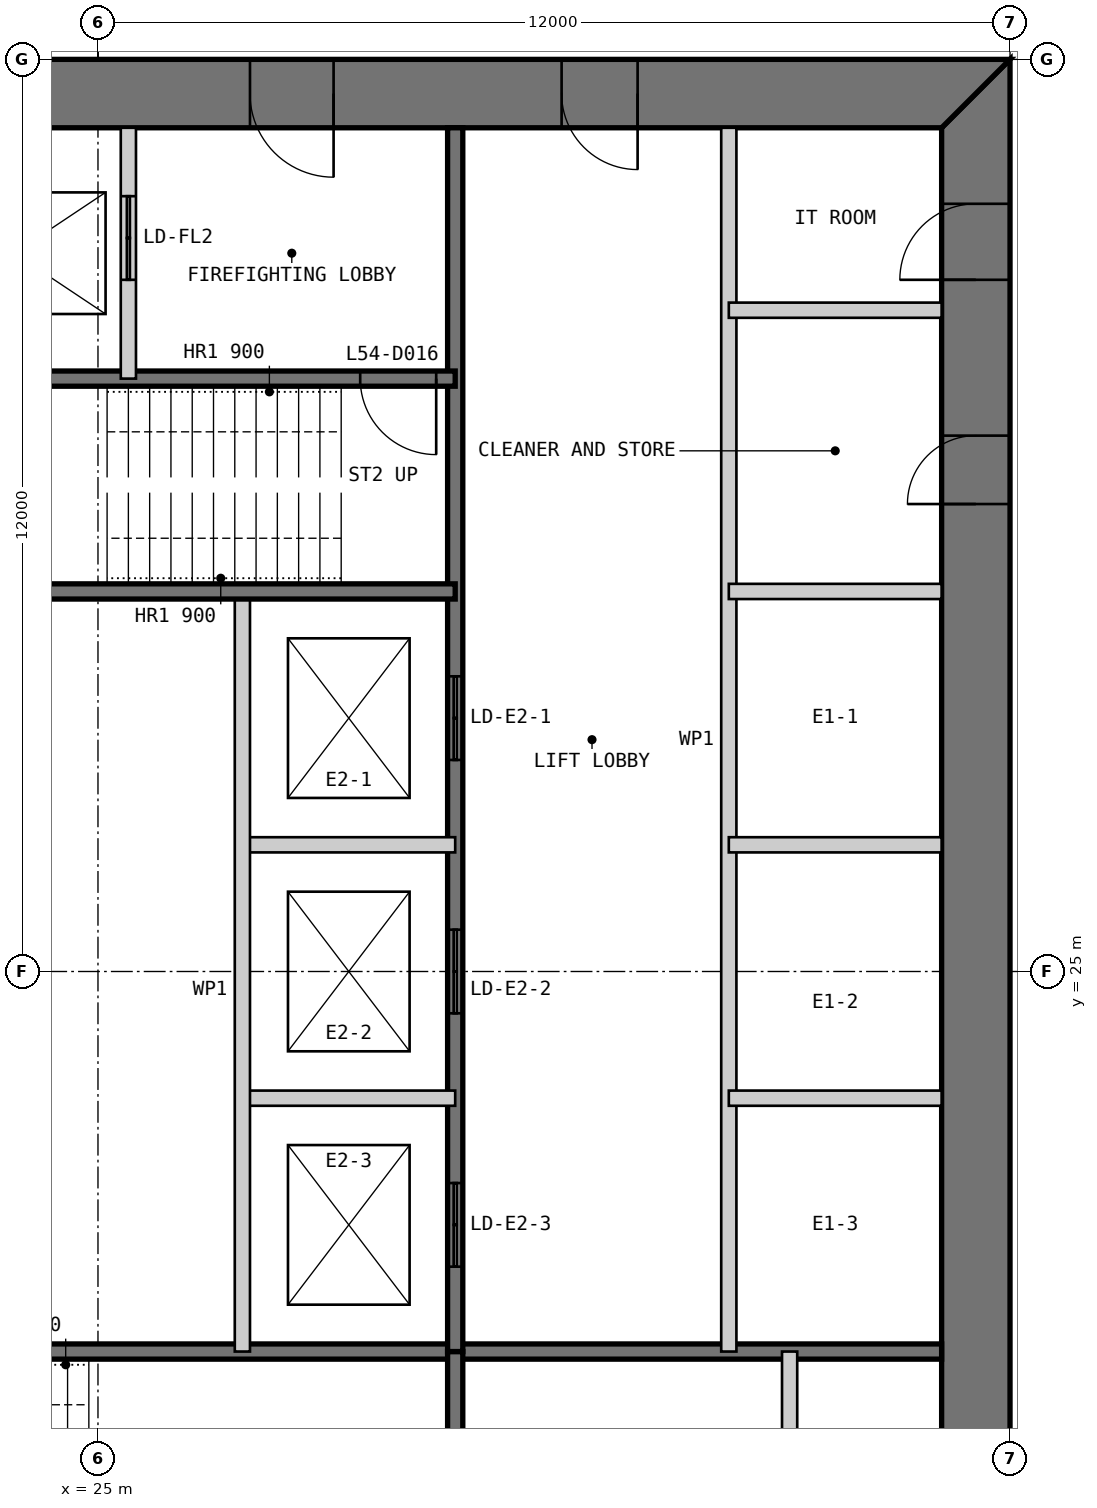
"""IFC4 building model, lengths in metres.
Left out: names, types, materials, properties, quantities, classifications, styles, units other than length and angle.
Written with IfcOpenShell. Run it as: python <this file> out.ifc"""

import sys

from ifc_helpers import new_model, si_unit, direction, frame, frame_2d, origin, place, context, subcontext, project, spatial, polyline, rectangle, outline, extrude, element, fill, save


model = new_model("IFC4")
c1 = context("Model", 3, precision=1e-05, world=origin(), true_north=direction((0.0, 1.0)))
c2 = subcontext(c1, "Body", "Model", "MODEL_VIEW")
j1 = project(units=[si_unit("LENGTHUNIT", "METRE"), si_unit("PLANEANGLEUNIT", "RADIAN")], contexts=[c1])
p1 = place(None, origin())
s1 = spatial("IfcSite", under=j1, at=p1, CompositionType="ELEMENT")
p2 = place(p1, origin())
s2 = spatial("IfcBuilding", under=s1, at=p2, CompositionType="ELEMENT")
p3 = place(p2, frame((0.0, 0.0, 229.8)))
s3 = spatial("IfcBuildingStorey", under=s2, at=p3, CompositionType="ELEMENT", Elevation=229.8)
p4 = place(p3, frame((36.55, 13.9, 0.0), z_axis=(0.0, 0.0, 1.0), x_axis=(0.0, 1.0, 0.0)))
e1 = element("IfcWall", 1, at=p4, inside=s3, PredefinedType="SHEAR", context=c2, shape_type="SweptSolid", body=[
    extrude(outline(polyline([(-0.9, -0.45), (23.1, -0.45), (22.2, 0.45), (0.0, 0.45), (-0.9, -0.45)])), origin(), (0.0, 0.0, 1.0), 4.0),
])
p5 = place(p4, frame((20.2, 0.0, 0.0)))
e2 = element("IfcOpeningElement", 2, at=p5, cuts=e1, PredefinedType="OPENING", context=c2, shape_type="SweptSolid", body=[
    extrude(rectangle(XDim=1.0, YDim=2.2, at=frame_2d((0.5, 1.1))), frame((0.0, 0.46, 0.0), z_axis=(0.0, -1.0, 0.0), x_axis=(1.0, 0.0, 0.0)), (0.0, 0.0, 1.0), 0.92),
])
p6 = place(p4, frame((17.25, 0.0, 0.0)))
e3 = element("IfcOpeningElement", 3, at=p6, cuts=e1, PredefinedType="OPENING", context=c2, shape_type="SweptSolid", body=[
    extrude(rectangle(XDim=0.9, YDim=2.2, at=frame_2d((0.45, 1.1))), frame((0.0, 0.46, 0.0), z_axis=(0.0, -1.0, 0.0), x_axis=(1.0, 0.0, 0.0)), (0.0, 0.0, 1.0), 0.92),
])
p7 = place(p3, frame((37.0, 36.55, 0.0), z_axis=(0.0, 0.0, 1.0), x_axis=(-1.0, 0.0, 0.0)))
e4 = element("IfcWall", 4, at=p7, inside=s3, PredefinedType="SHEAR", context=c2, shape_type="SweptSolid", body=[
    extrude(outline(polyline([(0.0, -0.45), (24.0, -0.45), (23.1, 0.45), (0.9, 0.45), (0.0, -0.45)])), origin(), (0.0, 0.0, 1.0), 4.0),
])
p8 = place(p7, frame((4.9, 0.0, 0.0)))
e5 = element("IfcOpeningElement", 5, at=p8, cuts=e4, PredefinedType="OPENING", context=c2, shape_type="SweptSolid", body=[
    extrude(rectangle(XDim=1.0, YDim=2.2, at=frame_2d((0.5, 1.1))), frame((0.0, 0.46, 0.0), z_axis=(0.0, -1.0, 0.0), x_axis=(1.0, 0.0, 0.0)), (0.0, 0.0, 1.0), 0.92),
])
p9 = place(p7, frame((8.9, 0.0, 0.0)))
e6 = element("IfcOpeningElement", 6, at=p9, cuts=e4, PredefinedType="OPENING", context=c2, shape_type="SweptSolid", body=[
    extrude(rectangle(XDim=1.1, YDim=2.2, at=frame_2d((0.55, 1.1))), frame((0.0, 0.46, 0.0), z_axis=(0.0, -1.0, 0.0), x_axis=(1.0, 0.0, 0.0)), (0.0, 0.0, 1.0), 0.92),
])
p10 = place(p7, frame((15.05, 0.0, 0.0)))
e7 = element("IfcOpeningElement", 7, at=p10, cuts=e4, PredefinedType="OPENING", context=c2, shape_type="SweptSolid", body=[
    extrude(rectangle(XDim=0.9, YDim=2.2, at=frame_2d((0.45, 1.1))), frame((0.0, 0.46, 0.0), z_axis=(0.0, -1.0, 0.0), x_axis=(1.0, 0.0, 0.0)), (0.0, 0.0, 1.0), 0.92),
])
p11 = place(p7, frame((17.9, 0.0, 0.0)))
e8 = element("IfcOpeningElement", 8, at=p11, cuts=e4, PredefinedType="OPENING", context=c2, shape_type="SweptSolid", body=[
    extrude(rectangle(XDim=1.0, YDim=2.2, at=frame_2d((0.5, 1.1))), frame((0.0, 0.46, 0.0), z_axis=(0.0, -1.0, 0.0), x_axis=(1.0, 0.0, 0.0)), (0.0, 0.0, 1.0), 0.92),
])
p12 = place(p7, frame((21.4, 0.0, 0.0)))
e9 = element("IfcOpeningElement", 9, at=p12, cuts=e4, PredefinedType="OPENING", context=c2, shape_type="SweptSolid", body=[
    extrude(rectangle(XDim=1.0, YDim=2.2, at=frame_2d((0.5, 1.1))), frame((0.0, 0.46, 0.0), z_axis=(0.0, -1.0, 0.0), x_axis=(1.0, 0.0, 0.0)), (0.0, 0.0, 1.0), 0.92),
])
p13 = place(p3, frame((20.3, 20.0, 0.0), z_axis=(0.0, 0.0, 1.0), x_axis=(1.0, 0.0, 0.0)))
e10 = element("IfcWall", 10, at=p13, inside=s3, PredefinedType="SOLIDWALL", context=c2, shape_type="SweptSolid", body=[
    extrude(rectangle(XDim=15.8, YDim=0.2, at=frame_2d((7.9, 0.0))), origin(), (0.0, 0.0, 1.0), 3.8),
])
p14 = place(p3, frame((29.7, 13.9, 0.0), z_axis=(0.0, 0.0, 1.0), x_axis=(0.0, 1.0, 0.0)))
e11 = element("IfcWall", 11, at=p14, inside=s3, PredefinedType="SOLIDWALL", context=c2, shape_type="SweptSolid", body=[
    extrude(rectangle(XDim=6.1, YDim=0.2, at=frame_2d((3.05, 0.0))), origin(), (0.0, 0.0, 1.0), 3.8),
])
p15 = place(p3, frame((34.1, 13.9, 0.0), z_axis=(0.0, 0.0, 1.0), x_axis=(0.0, 1.0, 0.0)))
e12 = element("IfcWall", 12, at=p15, inside=s3, PredefinedType="PARTITIONING", context=c2, shape_type="SweptSolid", body=[
    extrude(rectangle(XDim=6.1, YDim=0.2, at=frame_2d((3.05, 0.0))), origin(), (0.0, 0.0, 1.0), 3.8),
])
p16 = place(p3, frame((33.3, 36.1, 0.0), z_axis=(0.0, 0.0, 1.0), x_axis=(0.0, -1.0, 0.0)))
e13 = element("IfcWall", 13, at=p16, inside=s3, PredefinedType="PARTITIONING", context=c2, shape_type="SweptSolid", body=[
    extrude(rectangle(XDim=16.1, YDim=0.2, at=frame_2d((8.05, 0.0))), origin(), (0.0, 0.0, 1.0), 3.8),
])
p17 = place(p3, frame((29.7, 36.1, 0.0), z_axis=(0.0, 0.0, 1.0), x_axis=(0.0, -1.0, 0.0)))
e14 = element("IfcWall", 14, at=p17, inside=s3, PredefinedType="SOLIDWALL", context=c2, shape_type="SweptSolid", body=[
    extrude(rectangle(XDim=16.1, YDim=0.2, at=frame_2d((8.05, 0.0))), origin(), (0.0, 0.0, 1.0), 3.8),
])
p18 = place(p17, frame((7.217, 0.0, 0.0)))
e15 = element("IfcOpeningElement", 15, at=p18, cuts=e14, PredefinedType="OPENING", context=c2, shape_type="SweptSolid", body=[
    extrude(rectangle(XDim=1.1, YDim=2.2, at=frame_2d((0.55, 1.1))), frame((0.0, 0.11, 0.0), z_axis=(0.0, -1.0, 0.0), x_axis=(1.0, 0.0, 0.0)), (0.0, 0.0, 1.0), 0.22),
])
p19 = place(p17, frame((10.55, 0.0, 0.0)))
e16 = element("IfcOpeningElement", 16, at=p19, cuts=e14, PredefinedType="OPENING", context=c2, shape_type="SweptSolid", body=[
    extrude(rectangle(XDim=1.1, YDim=2.2, at=frame_2d((0.55, 1.1))), frame((0.0, 0.11, 0.0), z_axis=(0.0, -1.0, 0.0), x_axis=(1.0, 0.0, 0.0)), (0.0, 0.0, 1.0), 0.22),
])
p20 = place(p17, frame((13.883, 0.0, 0.0)))
e17 = element("IfcOpeningElement", 17, at=p20, cuts=e14, PredefinedType="OPENING", context=c2, shape_type="SweptSolid", body=[
    extrude(rectangle(XDim=1.1, YDim=2.2, at=frame_2d((0.55, 1.1))), frame((0.0, 0.11, 0.0), z_axis=(0.0, -1.0, 0.0), x_axis=(1.0, 0.0, 0.0)), (0.0, 0.0, 1.0), 0.22),
])
for number, where, z_axis, x_axis in (
    (18, (36.1, 30.0, 0.0), (0.0, 0.0, 1.0), (-1.0, 0.0, 0.0)),
    (19, (36.1, 26.667, 0.0), (0.0, 0.0, 1.0), (-1.0, 0.0, 0.0)),
    (20, (36.1, 23.333, 0.0), (0.0, 0.0, 1.0), (-1.0, 0.0, 0.0)),
    (21, (29.7, 26.667, 0.0), (0.0, 0.0, 1.0), (-1.0, 0.0, 0.0)),
    (22, (29.7, 23.333, 0.0), (0.0, 0.0, 1.0), (-1.0, 0.0, 0.0)),
):
    element("IfcWall", number, at=place(p3, frame(where, z_axis=z_axis, x_axis=x_axis)), inside=s3, PredefinedType="PARTITIONING", context=c2, shape_type="SweptSolid", body=[
        extrude(rectangle(XDim=2.8, YDim=0.2, at=frame_2d((1.4, 0.0))), origin(), (0.0, 0.0, 1.0), 3.8),
    ])
p21 = place(p3, frame((26.9, 30.0, 0.0), z_axis=(0.0, 0.0, 1.0), x_axis=(0.0, -1.0, 0.0)))
e23 = element("IfcWall", 23, at=p21, inside=s3, PredefinedType="PARTITIONING", context=c2, shape_type="SweptSolid", body=[
    extrude(rectangle(XDim=10.0, YDim=0.2, at=frame_2d((5.0, 0.0))), origin(), (0.0, 0.0, 1.0), 3.8),
])
p22 = place(p3, frame((29.7, 32.8, 0.0), z_axis=(0.0, 0.0, 1.0), x_axis=(-1.0, 0.0, 0.0)))
e24 = element("IfcWall", 24, at=p22, inside=s3, PredefinedType="SOLIDWALL", context=c2, shape_type="SweptSolid", body=[
    extrude(rectangle(XDim=9.4, YDim=0.2, at=frame_2d((4.7, 0.0))), origin(), (0.0, 0.0, 1.0), 3.8),
])
p23 = place(p22, frame((0.25, 0.0, 0.0)))
e25 = element("IfcOpeningElement", 25, at=p23, cuts=e24, PredefinedType="OPENING", context=c2, shape_type="SweptSolid", body=[
    extrude(rectangle(XDim=1.0, YDim=2.2, at=frame_2d((0.5, 1.1))), frame((0.0, 0.11, 0.0), z_axis=(0.0, -1.0, 0.0), x_axis=(1.0, 0.0, 0.0)), (0.0, 0.0, 1.0), 0.22),
])
p24 = place(p3, frame((29.7, 30.0, 0.0), z_axis=(0.0, 0.0, 1.0), x_axis=(-1.0, 0.0, 0.0)))
e26 = element("IfcWall", 26, at=p24, inside=s3, PredefinedType="SOLIDWALL", context=c2, shape_type="SweptSolid", body=[
    extrude(rectangle(XDim=15.8, YDim=0.2, at=frame_2d((7.9, 0.0))), origin(), (0.0, 0.0, 1.0), 3.8),
])
p25 = place(p3, frame((25.4, 36.1, 0.0), z_axis=(0.0, 0.0, 1.0), x_axis=(0.0, -1.0, 0.0)))
e27 = element("IfcWall", 27, at=p25, inside=s3, PredefinedType="PARTITIONING", context=c2, shape_type="SweptSolid", body=[
    extrude(rectangle(XDim=3.3, YDim=0.2, at=frame_2d((1.65, 0.0))), origin(), (0.0, 0.0, 1.0), 3.8),
])
p26 = place(p25, frame((0.9, 0.0, 0.0)))
e28 = element("IfcOpeningElement", 28, at=p26, cuts=e27, PredefinedType="OPENING", context=c2, shape_type="SweptSolid", body=[
    extrude(rectangle(XDim=1.1, YDim=2.2, at=frame_2d((0.55, 1.1))), frame((0.0, 0.11, 0.0), z_axis=(0.0, -1.0, 0.0), x_axis=(1.0, 0.0, 0.0)), (0.0, 0.0, 1.0), 0.22),
])
p27 = place(p3, frame((36.1, 33.7, 0.0), z_axis=(0.0, 0.0, 1.0), x_axis=(-1.0, 0.0, 0.0)))
e29 = element("IfcWall", 29, at=p27, inside=s3, PredefinedType="PARTITIONING", context=c2, shape_type="SweptSolid", body=[
    extrude(rectangle(XDim=2.8, YDim=0.2, at=frame_2d((1.4, 0.0))), origin(), (0.0, 0.0, 1.0), 3.8),
])
p28 = place(p8, origin())
e30 = element("IfcDoor", 30, at=p28, inside=s3, OperationType="SINGLE_SWING_LEFT", PredefinedType="DOOR", context=c2, shape_type="SweptSolid", body=[
    extrude(rectangle(XDim=1.0, YDim=2.2, at=frame_2d((0.5, 1.1))), frame((0.0, 0.025, 0.0), z_axis=(0.0, -1.0, 0.0), x_axis=(1.0, 0.0, 0.0)), (0.0, 0.0, 1.0), 0.05),
    extrude(outline(polyline([(0.0, 0.0), (0.04, 0.0), (0.04, 2.16), (0.96, 2.16), (0.96, 0.0), (1.0, 0.0), (1.0, 2.2), (0.0, 2.2), (0.0, 0.0)])), frame((0.0, 0.3, 0.0), z_axis=(0.0, -1.0, 0.0), x_axis=(1.0, 0.0, 0.0)), (0.0, 0.0, 1.0), 0.6),
])
fill(e5, e30)
p29 = place(p9, origin())
e31 = element("IfcDoor", 31, at=p29, inside=s3, OperationType="SINGLE_SWING_LEFT", PredefinedType="DOOR", context=c2, shape_type="SweptSolid", body=[
    extrude(rectangle(XDim=1.1, YDim=2.2, at=frame_2d((0.55, 1.1))), frame((0.0, 0.025, 0.0), z_axis=(0.0, -1.0, 0.0), x_axis=(1.0, 0.0, 0.0)), (0.0, 0.0, 1.0), 0.05),
    extrude(outline(polyline([(0.0, 0.0), (0.04, 0.0), (0.04, 2.16), (1.06, 2.16), (1.06, 0.0), (1.1, 0.0), (1.1, 2.2), (0.0, 2.2), (0.0, 0.0)])), frame((0.0, 0.3, 0.0), z_axis=(0.0, -1.0, 0.0), x_axis=(1.0, 0.0, 0.0)), (0.0, 0.0, 1.0), 0.6),
])
fill(e6, e31)
p30 = place(p23, origin())
e32 = element("IfcDoor", 32, at=p30, inside=s3, OperationType="SINGLE_SWING_LEFT", PredefinedType="DOOR", context=c2, shape_type="SweptSolid", body=[
    extrude(rectangle(XDim=1.0, YDim=2.2, at=frame_2d((0.5, 1.1))), frame((0.0, 0.025, 0.0), z_axis=(0.0, -1.0, 0.0), x_axis=(1.0, 0.0, 0.0)), (0.0, 0.0, 1.0), 0.05),
])
fill(e25, e32)
p31 = place(p5, origin())
e33 = element("IfcDoor", 33, at=p31, inside=s3, OperationType="SINGLE_SWING_LEFT", PredefinedType="DOOR", context=c2, shape_type="SweptSolid", body=[
    extrude(rectangle(XDim=1.0, YDim=2.2, at=frame_2d((0.5, 1.1))), frame((0.0, 0.025, 0.0), z_axis=(0.0, -1.0, 0.0), x_axis=(1.0, 0.0, 0.0)), (0.0, 0.0, 1.0), 0.05),
    extrude(outline(polyline([(0.0, 0.0), (0.04, 0.0), (0.04, 2.16), (0.96, 2.16), (0.96, 0.0), (1.0, 0.0), (1.0, 2.2), (0.0, 2.2), (0.0, 0.0)])), frame((0.0, 0.3, 0.0), z_axis=(0.0, -1.0, 0.0), x_axis=(1.0, 0.0, 0.0)), (0.0, 0.0, 1.0), 0.6),
])
fill(e2, e33)
p32 = place(p6, origin())
e34 = element("IfcDoor", 34, at=p32, inside=s3, OperationType="SINGLE_SWING_LEFT", PredefinedType="DOOR", context=c2, shape_type="SweptSolid", body=[
    extrude(rectangle(XDim=0.9, YDim=2.2, at=frame_2d((0.45, 1.1))), frame((0.0, 0.025, 0.0), z_axis=(0.0, -1.0, 0.0), x_axis=(1.0, 0.0, 0.0)), (0.0, 0.0, 1.0), 0.05),
    extrude(outline(polyline([(0.0, 0.0), (0.04, 0.0), (0.04, 2.16), (0.86, 2.16), (0.86, 0.0), (0.9, 0.0), (0.9, 2.2), (0.0, 2.2), (0.0, 0.0)])), frame((0.0, 0.3, 0.0), z_axis=(0.0, -1.0, 0.0), x_axis=(1.0, 0.0, 0.0)), (0.0, 0.0, 1.0), 0.6),
])
fill(e3, e34)
p33 = place(p26, origin())
e35 = element("IfcDoor", 35, at=p33, inside=s3, OperationType="DOUBLE_DOOR_SLIDING", PredefinedType="DOOR", context=c2, shape_type="SweptSolid", body=[
    extrude(rectangle(XDim=1.1, YDim=2.2, at=frame_2d((0.55, 1.1))), frame((0.0, 0.025, 0.0), z_axis=(0.0, -1.0, 0.0), x_axis=(1.0, 0.0, 0.0)), (0.0, 0.0, 1.0), 0.05),
])
fill(e28, e35)
p34 = place(p18, origin())
e36 = element("IfcDoor", 36, at=p34, inside=s3, OperationType="DOUBLE_DOOR_SLIDING", PredefinedType="DOOR", context=c2, shape_type="SweptSolid", body=[
    extrude(rectangle(XDim=1.1, YDim=2.2, at=frame_2d((0.55, 1.1))), frame((0.0, 0.025, 0.0), z_axis=(0.0, -1.0, 0.0), x_axis=(1.0, 0.0, 0.0)), (0.0, 0.0, 1.0), 0.05),
])
fill(e15, e36)
p35 = place(p19, origin())
e37 = element("IfcDoor", 37, at=p35, inside=s3, OperationType="DOUBLE_DOOR_SLIDING", PredefinedType="DOOR", context=c2, shape_type="SweptSolid", body=[
    extrude(rectangle(XDim=1.1, YDim=2.2, at=frame_2d((0.55, 1.1))), frame((0.0, 0.025, 0.0), z_axis=(0.0, -1.0, 0.0), x_axis=(1.0, 0.0, 0.0)), (0.0, 0.0, 1.0), 0.05),
])
fill(e16, e37)
p36 = place(p20, origin())
e38 = element("IfcDoor", 38, at=p36, inside=s3, OperationType="DOUBLE_DOOR_SLIDING", PredefinedType="DOOR", context=c2, shape_type="SweptSolid", body=[
    extrude(rectangle(XDim=1.1, YDim=2.2, at=frame_2d((0.55, 1.1))), frame((0.0, 0.025, 0.0), z_axis=(0.0, -1.0, 0.0), x_axis=(1.0, 0.0, 0.0)), (0.0, 0.0, 1.0), 0.05),
])
fill(e17, e38)
save(model, sys.argv[1])
